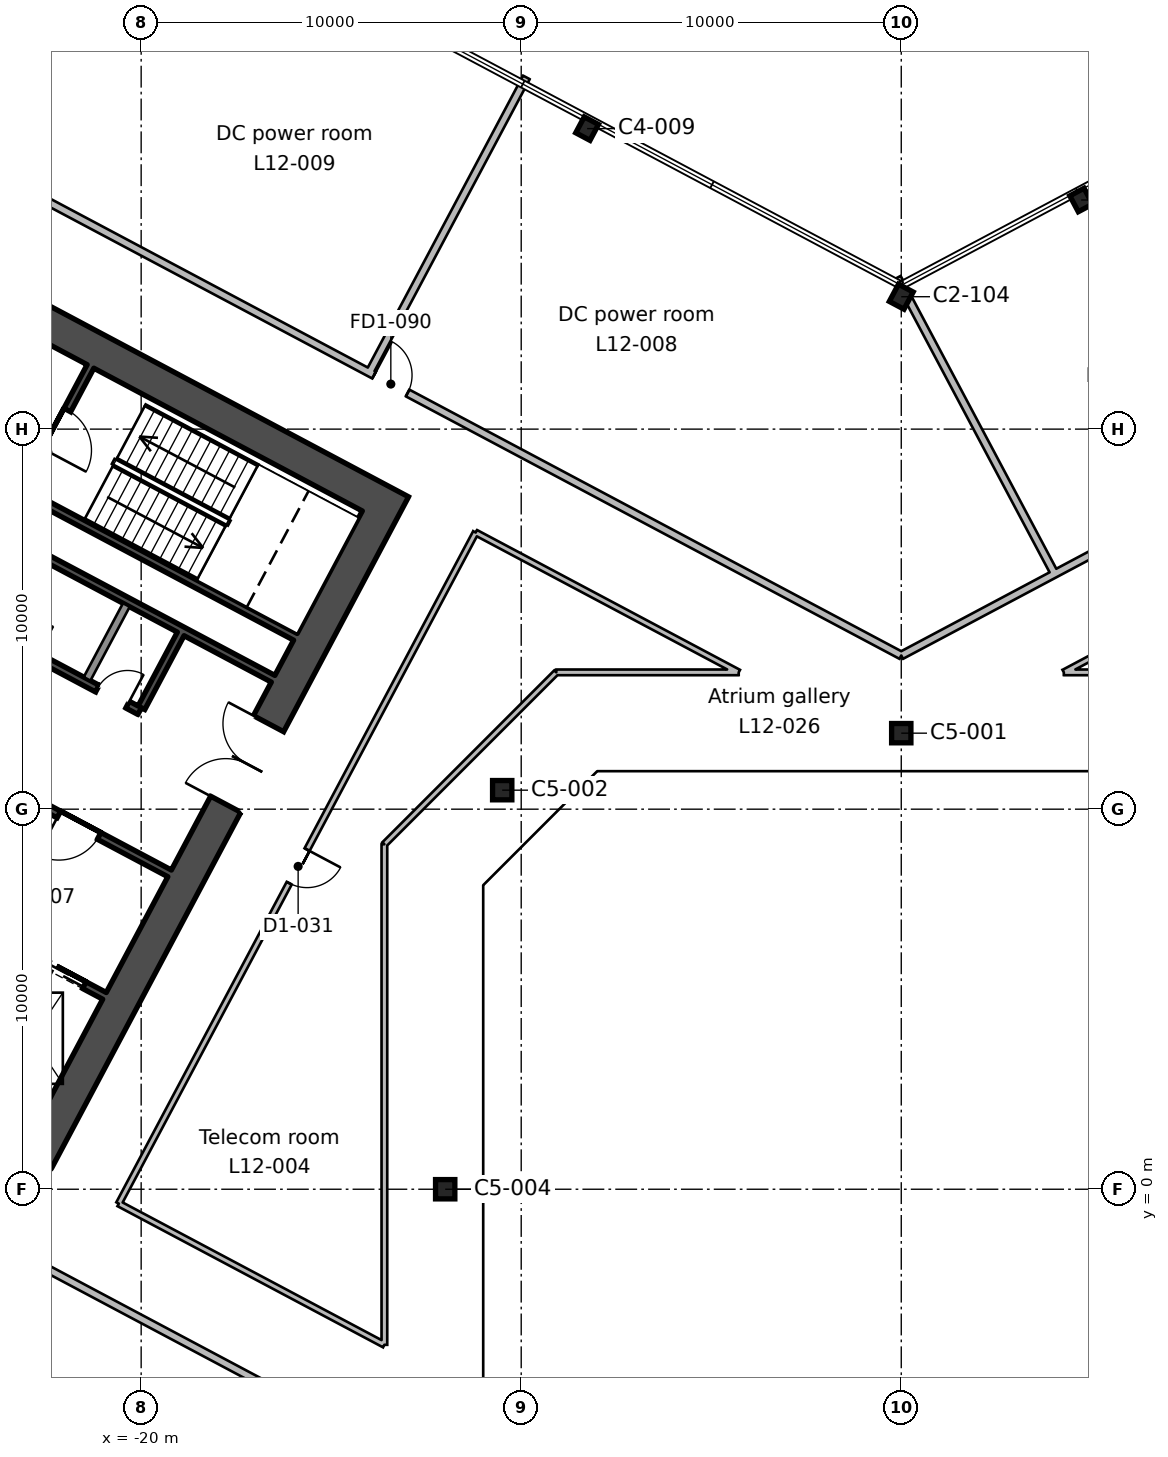
"""IFC4 building model, lengths in metres.
Left out: names, types, materials, properties, quantities, classifications, styles, units other than length and angle.
Written with IfcOpenShell. Run it as: python <this file> out.ifc"""

import sys

from ifc_helpers import new_model, si_unit, direction, frame, frame_2d, origin, origin_2d, place, context, subcontext, project, spatial, rectangle, hollow_rectangle, i_section, extrude, element, fill, save


model = new_model("IFC4")
c1 = context("Model", 3, precision=1e-05, world=origin(), true_north=direction((0.0, 1.0)))
c2 = subcontext(c1, "Body", "Model", "MODEL_VIEW")
j1 = project(units=[si_unit("LENGTHUNIT", "METRE"), si_unit("PLANEANGLEUNIT", "RADIAN")], contexts=[c1])
p1 = place(None, origin())
s1 = spatial("IfcSite", under=j1, at=p1, CompositionType="ELEMENT")
p2 = place(p1, origin())
s2 = spatial("IfcBuilding", under=s1, at=p2, CompositionType="ELEMENT")
p3 = place(p2, frame((0.0, 0.0, 66.2)))
s3 = spatial("IfcBuildingStorey", under=s2, at=p3, CompositionType="ELEMENT", Elevation=66.2)
for number, where, z_axis, x_axis in (
    (1, (-12.0, 0.0, 0.0), (0.0, 0.0, 1.0), (1.0, 0.0, 0.0)),
    (2, (-10.5, 10.5, 0.0), (0.0, 0.0, 1.0), (1.0, 0.0, 0.0)),
    (3, (0.0, 12.0, 0.0), (0.0, 0.0, 1.0), (1.0, 0.0, 0.0)),
):
    element("IfcColumn", number, at=place(p3, frame(where, z_axis=z_axis, x_axis=x_axis)), inside=s3, PredefinedType="COLUMN", context=c2, shape_type="SweptSolid", body=[
        extrude(hollow_rectangle(XDim=0.508, YDim=0.508, WallThickness=0.021, InnerFilletRadius=0.01, OuterFilletRadius=0.031, at=origin_2d()), origin(), (0.0, 0.0, 1.0), 4.6),
    ])
p4 = place(p3, frame((0.0, 23.484, 0.0), z_axis=(0.0, 0.0, 1.0), x_axis=(-0.882947592859, 0.469471562786, 0.0)))
e4 = element("IfcColumn", 4, at=p4, inside=s3, PredefinedType="COLUMN", context=c2, shape_type="SweptSolid", body=[
    extrude(i_section(OverallWidth=0.437, OverallDepth=0.513, WebThickness=0.061, FlangeThickness=0.097, FilletRadius=0.015, at=origin_2d()), origin(), (0.0, 0.0, 1.0), 4.6),
])
for number, where, z_axis, x_axis in (
    (5, (4.734, 26.029, 0.0), (0.0, 0.0, 1.0), (-0.883, -0.469, 0.0)),
    (6, (-8.266, 27.907, 0.0), (0.0, 0.0, 1.0), (-0.883, 0.469, 0.0)),
):
    element("IfcColumn", number, at=place(p3, frame(where, z_axis=z_axis, x_axis=x_axis)), inside=s3, PredefinedType="COLUMN", context=c2, shape_type="SweptSolid", body=[
        extrude(i_section(OverallWidth=0.424, OverallDepth=0.475, WebThickness=0.048, FlangeThickness=0.077, FilletRadius=0.015, at=origin_2d()), origin(), (0.0, 0.0, 1.0), 4.6),
    ])
p5 = place(p3, frame((-13.362, 18.43, 0.0), z_axis=(0.0, 0.0, 1.0), x_axis=(-0.46947084998, -0.882947971864, 0.0)))
e7 = element("IfcWall", 7, at=p5, inside=s3, PredefinedType="SHEAR", context=c2, shape_type="SweptSolid", body=[
    extrude(rectangle(XDim=20.0, YDim=0.9, at=frame_2d((10.0, 0.0))), origin(), (0.0, 0.0, 1.0), 4.6),
])
p6 = place(p5, frame((7.0, 0.0, 0.0)))
e8 = element("IfcOpeningElement", 8, at=p6, cuts=e7, PredefinedType="OPENING", context=c2, shape_type="SweptSolid", body=[
    extrude(rectangle(XDim=2.4, YDim=2.4, at=frame_2d((1.2, 1.2))), frame((0.0, 0.46, 0.0), z_axis=(0.0, -1.0, 0.0), x_axis=(1.0, 0.0, 0.0)), (0.0, 0.0, 1.0), 0.92),
])
p7 = place(p3, frame((-13.97, 18.244, 0.0), z_axis=(0.0, 0.0, 1.0), x_axis=(-0.88294509198, 0.469476266226, 0.0)))
e9 = element("IfcWall", 9, at=p7, inside=s3, PredefinedType="SHEAR", context=c2, shape_type="SweptSolid", body=[
    extrude(rectangle(XDim=20.2, YDim=0.9, at=frame_2d((10.1, 0.0))), origin(), (0.0, 0.0, 1.0), 4.6),
])
p8 = place(p3, frame((-18.96, 14.611, 0.0), z_axis=(0.0, 0.0, 1.0), x_axis=(-0.4694473164, -0.882960484464, 0.0)))
e10 = element("IfcWall", 10, at=p8, inside=s3, PredefinedType="SHEAR", context=c2, shape_type="SweptSolid", body=[
    extrude(rectangle(XDim=2.2, YDim=0.2, at=frame_2d((1.1, 0.0))), origin(), (0.0, 0.0, 1.0), 4.6),
])
p9 = place(p3, frame((-20.39, 15.372, 0.0), z_axis=(0.0, 0.0, 1.0), x_axis=(-0.4694473164, -0.882960484464, 0.0)))
e11 = element("IfcWall", 11, at=p9, inside=s3, PredefinedType="SOLIDWALL", context=c2, shape_type="SweptSolid", body=[
    extrude(rectangle(XDim=2.2, YDim=0.2, at=frame_2d((1.1, 0.0))), origin(), (0.0, 0.0, 1.0), 4.6),
])
p10 = place(p3, frame((-21.333, 21.649, 0.0), z_axis=(0.0, 0.0, 1.0), x_axis=(-0.469494272526, -0.882935517501, 0.0)))
e12 = element("IfcWall", 12, at=p10, inside=s3, PredefinedType="SHEAR", context=c2, shape_type="SweptSolid", body=[
    extrude(rectangle(XDim=7.3, YDim=0.2, at=frame_2d((3.65, 0.0))), origin(), (0.0, 0.0, 1.0), 4.6),
])
p11 = place(p10, frame((1.3, 0.0, 0.0)))
e13 = element("IfcOpeningElement", 13, at=p11, cuts=e12, PredefinedType="OPENING", context=c2, shape_type="SweptSolid", body=[
    extrude(rectangle(XDim=1.2, YDim=2.1, at=frame_2d((0.6, 1.05))), frame((0.0, 0.11, 0.0), z_axis=(0.0, -1.0, 0.0), x_axis=(1.0, 0.0, 0.0)), (0.0, 0.0, 1.0), 0.22),
])
p12 = place(p3, frame((-15.942, 14.536, 0.0), z_axis=(0.0, 0.0, 1.0), x_axis=(-0.882946947542, 0.469472776449, 0.0)))
e14 = element("IfcWall", 14, at=p12, inside=s3, PredefinedType="SHEAR", context=c2, shape_type="SweptSolid", body=[
    extrude(rectangle(XDim=8.0, YDim=0.2, at=frame_2d((4.0, 0.0))), origin(), (0.0, 0.0, 1.0), 4.6),
])
p13 = place(p3, frame((-16.529, 13.432, 0.0), z_axis=(0.0, 0.0, 1.0), x_axis=(-0.88295287151, 0.469461634952, 0.0)))
e15 = element("IfcWall", 15, at=p13, inside=s3, PredefinedType="SHEAR", context=c2, shape_type="SweptSolid", body=[
    extrude(rectangle(XDim=8.0, YDim=0.2, at=frame_2d((4.0, 0.0))), origin(), (0.0, 0.0, 1.0), 4.6),
])
p14 = place(p3, frame((-20.04, 12.581, 0.0), z_axis=(0.0, 0.0, 1.0), x_axis=(-0.882942972946, 0.469480251476, 0.0)))
e16 = element("IfcWall", 16, at=p14, inside=s3, PredefinedType="SHEAR", context=c2, shape_type="SweptSolid", body=[
    extrude(rectangle(XDim=5.4, YDim=0.2, at=frame_2d((2.7, 0.0))), origin(), (0.0, 0.0, 1.0), 4.6),
])
p15 = place(p14, frame((0.36, 0.0, 0.0)))
e17 = element("IfcOpeningElement", 17, at=p15, cuts=e16, PredefinedType="OPENING", context=c2, shape_type="SweptSolid", body=[
    extrude(rectangle(XDim=0.9, YDim=2.1, at=frame_2d((0.45, 1.05))), frame((0.0, 0.11, 0.0), z_axis=(0.0, -1.0, 0.0), x_axis=(1.0, 0.0, 0.0)), (0.0, 0.0, 1.0), 0.22),
])
p16 = place(p14, frame((3.06, 0.0, 0.0)))
e18 = element("IfcOpeningElement", 18, at=p16, cuts=e16, PredefinedType="OPENING", context=c2, shape_type="SweptSolid", body=[
    extrude(rectangle(XDim=0.9, YDim=2.1, at=frame_2d((0.45, 1.05))), frame((0.0, 0.11, 0.0), z_axis=(0.0, -1.0, 0.0), x_axis=(1.0, 0.0, 0.0)), (0.0, 0.0, 1.0), 0.22),
])
p17 = place(p3, frame((-19.252, 8.311, 0.0), z_axis=(0.0, 0.0, 1.0), x_axis=(-0.882955722218, 0.469456273365, 0.0)))
e19 = element("IfcWall", 19, at=p17, inside=s3, PredefinedType="SHEAR", context=c2, shape_type="SweptSolid", body=[
    extrude(rectangle(XDim=10.0, YDim=0.2, at=frame_2d((5.0, 0.0))), origin(), (0.0, 0.0, 1.0), 4.6),
])
p18 = place(p17, frame((2.1, 0.0, 0.0)))
e20 = element("IfcOpeningElement", 20, at=p18, cuts=e19, PredefinedType="OPENING", context=c2, shape_type="SweptSolid", body=[
    extrude(rectangle(XDim=1.2, YDim=2.1, at=frame_2d((0.6, 1.05))), frame((0.0, 0.11, 0.0), z_axis=(0.0, -1.0, 0.0), x_axis=(1.0, 0.0, 0.0)), (0.0, 0.0, 1.0), 0.22),
])
p19 = place(p3, frame((-20.965, 5.088, 0.0), z_axis=(0.0, 0.0, 1.0), x_axis=(-0.882925986334, 0.469512196493, 0.0)))
e21 = element("IfcWall", 21, at=p19, inside=s3, PredefinedType="SHEAR", context=c2, shape_type="SweptSolid", body=[
    extrude(rectangle(XDim=4.5, YDim=0.2, at=frame_2d((2.25, 0.0))), origin(), (0.0, 0.0, 1.0), 4.6),
])
p20 = place(p19, frame((0.6, 0.0, 0.0)))
e22 = element("IfcOpeningElement", 22, at=p20, cuts=e21, PredefinedType="OPENING", context=c2, shape_type="SweptSolid", body=[
    extrude(rectangle(XDim=1.1, YDim=2.1, at=frame_2d((0.55, 1.05))), frame((0.0, 0.11, 0.0), z_axis=(0.0, -1.0, 0.0), x_axis=(1.0, 0.0, 0.0)), (0.0, 0.0, 1.0), 0.22),
])
p21 = place(p3, frame((-48.541, 39.854, 0.0), z_axis=(0.0, 0.0, 1.0), x_axis=(0.882945008423, -0.469476423372, 0.0)))
e23 = element("IfcWall", 23, at=p21, inside=s3, PredefinedType="PARTITIONING", context=c2, shape_type="SweptSolid", body=[
    extrude(rectangle(XDim=54.976, YDim=0.2, at=frame_2d((27.488, 0.0))), origin(), (0.0, 0.0, 1.0), 4.2),
])
p22 = place(p21, frame((39.265, 0.0, 0.0)))
e24 = element("IfcOpeningElement", 24, at=p22, cuts=e23, PredefinedType="OPENING", context=c2, shape_type="SweptSolid", body=[
    extrude(rectangle(XDim=1.0, YDim=2.1, at=frame_2d((0.5, 1.05))), frame((0.0, 0.11, 0.0), z_axis=(0.0, -1.0, 0.0), x_axis=(1.0, 0.0, 0.0)), (0.0, 0.0, 1.0), 0.22),
])
p23 = place(p21, frame((27.265, 0.0, 0.0)))
e25 = element("IfcOpeningElement", 25, at=p23, cuts=e23, PredefinedType="OPENING", context=c2, shape_type="SweptSolid", body=[
    extrude(rectangle(XDim=1.0, YDim=2.1, at=frame_2d((0.5, 1.05))), frame((0.0, 0.11, 0.0), z_axis=(0.0, -1.0, 0.0), x_axis=(1.0, 0.0, 0.0)), (0.0, 0.0, 1.0), 0.22),
])
p24 = place(p21, frame((21.065, 0.0, 0.0)))
e26 = element("IfcOpeningElement", 26, at=p24, cuts=e23, PredefinedType="OPENING", context=c2, shape_type="SweptSolid", body=[
    extrude(rectangle(XDim=0.95, YDim=2.1, at=frame_2d((0.475, 1.05))), frame((0.0, 0.11, 0.0), z_axis=(0.0, -1.0, 0.0), x_axis=(1.0, 0.0, 0.0)), (0.0, 0.0, 1.0), 0.22),
])
p25 = place(p21, frame((15.365, 0.0, 0.0)))
e27 = element("IfcOpeningElement", 27, at=p25, cuts=e23, PredefinedType="OPENING", context=c2, shape_type="SweptSolid", body=[
    extrude(rectangle(XDim=1.0, YDim=2.1, at=frame_2d((0.5, 1.05))), frame((0.0, 0.11, 0.0), z_axis=(0.0, -1.0, 0.0), x_axis=(1.0, 0.0, 0.0)), (0.0, 0.0, 1.0), 0.22),
])
p26 = place(p3, frame((0.0, 14.044, 0.0), z_axis=(0.0, 0.0, 1.0), x_axis=(0.882943219941, 0.469479786955, 0.0)))
e28 = element("IfcWall", 28, at=p26, inside=s3, PredefinedType="PARTITIONING", context=c2, shape_type="SweptSolid", body=[
    extrude(rectangle(XDim=65.607, YDim=0.2, at=frame_2d((32.803, 0.0))), origin(), (0.0, 0.0, 1.0), 4.2),
])
p27 = place(p26, frame((35.55, 0.0, 0.0)))
e29 = element("IfcOpeningElement", 29, at=p27, cuts=e28, PredefinedType="OPENING", context=c2, shape_type="SweptSolid", body=[
    extrude(rectangle(XDim=1.0, YDim=2.1, at=frame_2d((0.5, 1.05))), frame((0.0, 0.11, 0.0), z_axis=(0.0, -1.0, 0.0), x_axis=(1.0, 0.0, 0.0)), (0.0, 0.0, 1.0), 0.22),
])
p28 = place(p26, frame((32.15, 0.0, 0.0)))
e30 = element("IfcOpeningElement", 30, at=p28, cuts=e28, PredefinedType="OPENING", context=c2, shape_type="SweptSolid", body=[
    extrude(rectangle(XDim=1.0, YDim=2.1, at=frame_2d((0.5, 1.05))), frame((0.0, 0.11, 0.0), z_axis=(0.0, -1.0, 0.0), x_axis=(1.0, 0.0, 0.0)), (0.0, 0.0, 1.0), 0.22),
])
p29 = place(p26, frame((13.95, 0.0, 0.0)))
e31 = element("IfcOpeningElement", 31, at=p29, cuts=e28, PredefinedType="OPENING", context=c2, shape_type="SweptSolid", body=[
    extrude(rectangle(XDim=1.0, YDim=2.1, at=frame_2d((0.5, 1.05))), frame((0.0, 0.11, 0.0), z_axis=(0.0, -1.0, 0.0), x_axis=(1.0, 0.0, 0.0)), (0.0, 0.0, 1.0), 0.22),
])
p30 = place(p3, frame((-13.6, -6.813, 0.0), z_axis=(0.0, 0.0, 1.0), x_axis=(-0.882934546757, 0.469496098113, 0.0)))
e32 = element("IfcWall", 32, at=p30, inside=s3, PredefinedType="PARTITIONING", context=c2, shape_type="SweptSolid", body=[
    extrude(rectangle(XDim=36.758, YDim=0.2, at=frame_2d((18.379, 0.0))), origin(), (0.0, 0.0, 1.0), 4.2),
])
p31 = place(p30, frame((20.35, 0.0, 0.0)))
e33 = element("IfcOpeningElement", 33, at=p31, cuts=e32, PredefinedType="OPENING", context=c2, shape_type="SweptSolid", body=[
    extrude(rectangle(XDim=1.0, YDim=2.1, at=frame_2d((0.5, 1.05))), frame((0.0, 0.11, 0.0), z_axis=(0.0, -1.0, 0.0), x_axis=(1.0, 0.0, 0.0)), (0.0, 0.0, 1.0), 0.22),
])
p32 = place(p30, frame((17.85, 0.0, 0.0)))
e34 = element("IfcOpeningElement", 34, at=p32, cuts=e32, PredefinedType="OPENING", context=c2, shape_type="SweptSolid", body=[
    extrude(rectangle(XDim=1.0, YDim=2.1, at=frame_2d((0.5, 1.05))), frame((0.0, 0.11, 0.0), z_axis=(0.0, -1.0, 0.0), x_axis=(1.0, 0.0, 0.0)), (0.0, 0.0, 1.0), 0.22),
])
p33 = place(p3, frame((-9.864, 29.255, 0.0), z_axis=(0.0, 0.0, 1.0), x_axis=(-0.469457446168, -0.882955098653, 0.0)))
e35 = element("IfcWall", 35, at=p33, inside=s3, PredefinedType="PARTITIONING", context=c2, shape_type="SweptSolid", body=[
    extrude(rectangle(XDim=8.8, YDim=0.2, at=frame_2d((4.4, 0.0))), origin(), (0.0, 0.0, 1.0), 4.2),
])
p34 = place(p3, frame((-0.105, 23.984, 0.0), z_axis=(0.0, 0.0, 1.0), x_axis=(0.469424872141, -0.882972417132, 0.0)))
e36 = element("IfcWall", 36, at=p34, inside=s3, PredefinedType="PARTITIONING", context=c2, shape_type="SweptSolid", body=[
    extrude(rectangle(XDim=8.826, YDim=0.2, at=frame_2d((4.413, 0.0))), origin(), (0.0, 0.0, 1.0), 4.2),
])
p35 = place(p3, frame((-20.588, -0.379, 0.0), z_axis=(0.0, 0.0, 1.0), x_axis=(0.469489882812, 0.882937851685, 0.0)))
e37 = element("IfcWall", 37, at=p35, inside=s3, PredefinedType="PARTITIONING", context=c2, shape_type="SweptSolid", body=[
    extrude(rectangle(XDim=20.0, YDim=0.15, at=frame_2d((10.0, 0.0))), origin(), (0.0, 0.0, 1.0), 4.2),
])
p36 = place(p35, frame((9.55, 0.0, 0.0)))
e38 = element("IfcOpeningElement", 38, at=p36, cuts=e37, PredefinedType="OPENING", context=c2, shape_type="SweptSolid", body=[
    extrude(rectangle(XDim=1.0, YDim=2.1, at=frame_2d((0.5, 1.05))), frame((0.0, 0.085, 0.0), z_axis=(0.0, -1.0, 0.0), x_axis=(1.0, 0.0, 0.0)), (0.0, 0.0, 1.0), 0.17),
])
p37 = place(p3, frame((-11.198, 17.28, 0.0), z_axis=(0.0, 0.0, 1.0), x_axis=(0.882946288452, -0.46947401601, 0.0)))
e39 = element("IfcWall", 39, at=p37, inside=s3, PredefinedType="PARTITIONING", context=c2, shape_type="SweptSolid", body=[
    extrude(rectangle(XDim=7.838, YDim=0.15, at=frame_2d((3.919, 0.0))), origin(), (0.0, 0.0, 1.0), 4.2),
])
p38 = place(p3, frame((-4.277, 13.6, 0.0), z_axis=(0.0, 0.0, 1.0), x_axis=(-1.0, 0.0, 0.0)))
e40 = element("IfcWall", 40, at=p38, inside=s3, PredefinedType="PARTITIONING", context=c2, shape_type="SweptSolid", body=[
    extrude(rectangle(XDim=4.8, YDim=0.15, at=frame_2d((2.4, 0.0))), origin(), (0.0, 0.0, 1.0), 4.2),
])
p39 = place(p3, frame((-9.077, 13.6, 0.0), z_axis=(0.0, 0.0, 1.0), x_axis=(-0.707106781187, -0.707106781187, 0.0)))
e41 = element("IfcWall", 41, at=p39, inside=s3, PredefinedType="PARTITIONING", context=c2, shape_type="SweptSolid", body=[
    extrude(rectangle(XDim=6.397, YDim=0.15, at=frame_2d((3.198, 0.0))), origin(), (0.0, 0.0, 1.0), 4.2),
])
p40 = place(p3, frame((-13.6, 9.077, 0.0), z_axis=(0.0, 0.0, 1.0), x_axis=(0.0, -1.0, 0.0)))
e42 = element("IfcWall", 42, at=p40, inside=s3, PredefinedType="PARTITIONING", context=c2, shape_type="SweptSolid", body=[
    extrude(rectangle(XDim=13.171, YDim=0.15, at=frame_2d((6.585, 0.0))), origin(), (0.0, 0.0, 1.0), 4.2),
])
p41 = place(p3, frame((-13.6, -4.094, 0.0), z_axis=(0.0, 0.0, 1.0), x_axis=(-0.882967890474, 0.469433386533, 0.0)))
e43 = element("IfcWall", 43, at=p41, inside=s3, PredefinedType="PARTITIONING", context=c2, shape_type="SweptSolid", body=[
    extrude(rectangle(XDim=7.914, YDim=0.15, at=frame_2d((3.957, 0.0))), origin(), (0.0, 0.0, 1.0), 4.2),
])
p42 = place(p3, frame((7.667, 15.402, 0.0), z_axis=(0.0, 0.0, 1.0), x_axis=(-0.882994654303, -0.469383042378, 0.0)))
e44 = element("IfcWall", 44, at=p42, inside=s3, PredefinedType="PARTITIONING", context=c2, shape_type="SweptSolid", body=[
    extrude(rectangle(XDim=3.839, YDim=0.15, at=frame_2d((1.919, 0.0))), origin(), (0.0, 0.0, 1.0), 4.2),
])
p43 = place(p3, frame((4.277, 13.6, 0.0), z_axis=(0.0, 0.0, 1.0), x_axis=(1.0, 0.0, 0.0)))
e45 = element("IfcWall", 45, at=p43, inside=s3, PredefinedType="PARTITIONING", context=c2, shape_type="SweptSolid", body=[
    extrude(rectangle(XDim=4.348, YDim=0.15, at=frame_2d((2.174, 0.0))), origin(), (0.0, 0.0, 1.0), 4.2),
])
p44 = place(p6, frame((2.4, 0.0, 0.0), z_axis=(0.0, 0.0, 1.0), x_axis=(-1.0, 0.0, 0.0)))
e46 = element("IfcDoor", 46, at=p44, inside=s3, OperationType="DOUBLE_DOOR_SINGLE_SWING", PredefinedType="DOOR", context=c2, shape_type="SweptSolid", body=[
    extrude(rectangle(XDim=2.4, YDim=2.4, at=frame_2d((1.2, 1.2))), frame((0.0, 0.025, 0.0), z_axis=(0.0, -1.0, 0.0), x_axis=(1.0, 0.0, 0.0)), (0.0, 0.0, 1.0), 0.05),
])
fill(e8, e46)
p45 = place(p18, origin())
e47 = element("IfcDoor", 47, at=p45, inside=s3, OperationType="SINGLE_SWING_RIGHT", PredefinedType="DOOR", context=c2, shape_type="SweptSolid", body=[
    extrude(rectangle(XDim=1.2, YDim=2.1, at=frame_2d((0.6, 1.05))), frame((0.0, 0.025, 0.0), z_axis=(0.0, -1.0, 0.0), x_axis=(1.0, 0.0, 0.0)), (0.0, 0.0, 1.0), 0.05),
])
fill(e20, e47)
p46 = place(p11, origin())
e48 = element("IfcDoor", 48, at=p46, inside=s3, OperationType="SINGLE_SWING_RIGHT", PredefinedType="DOOR", context=c2, shape_type="SweptSolid", body=[
    extrude(rectangle(XDim=1.2, YDim=2.1, at=frame_2d((0.6, 1.05))), frame((0.0, 0.025, 0.0), z_axis=(0.0, -1.0, 0.0), x_axis=(1.0, 0.0, 0.0)), (0.0, 0.0, 1.0), 0.05),
])
fill(e13, e48)
p47 = place(p15, frame((0.9, 0.0, 0.0), z_axis=(0.0, 0.0, 1.0), x_axis=(-1.0, 0.0, 0.0)))
e49 = element("IfcDoor", 49, at=p47, inside=s3, OperationType="SINGLE_SWING_RIGHT", PredefinedType="DOOR", context=c2, shape_type="SweptSolid", body=[
    extrude(rectangle(XDim=0.9, YDim=2.1, at=frame_2d((0.45, 1.05))), frame((0.0, 0.025, 0.0), z_axis=(0.0, -1.0, 0.0), x_axis=(1.0, 0.0, 0.0)), (0.0, 0.0, 1.0), 0.05),
])
fill(e17, e49)
p48 = place(p20, origin())
e50 = element("IfcDoor", 50, at=p48, inside=s3, OperationType="DOUBLE_DOOR_SLIDING", PredefinedType="DOOR", context=c2, shape_type="SweptSolid", body=[
    extrude(rectangle(XDim=1.1, YDim=2.1, at=frame_2d((0.55, 1.05))), frame((0.0, 0.025, 0.0), z_axis=(0.0, -1.0, 0.0), x_axis=(1.0, 0.0, 0.0)), (0.0, 0.0, 1.0), 0.05),
])
fill(e22, e50)
p49 = place(p36, frame((1.0, 0.0, 0.0), z_axis=(0.0, 0.0, 1.0), x_axis=(-1.0, 0.0, 0.0)))
e51 = element("IfcDoor", 51, at=p49, inside=s3, OperationType="SINGLE_SWING_LEFT", PredefinedType="DOOR", context=c2, shape_type="SweptSolid", body=[
    extrude(rectangle(XDim=1.0, YDim=2.1, at=frame_2d((0.5, 1.05))), frame((0.0, 0.025, 0.0), z_axis=(0.0, -1.0, 0.0), x_axis=(1.0, 0.0, 0.0)), (0.0, 0.0, 1.0), 0.05),
])
fill(e38, e51)
p50 = place(p22, origin())
e52 = element("IfcDoor", 52, at=p50, inside=s3, OperationType="SINGLE_SWING_LEFT", PredefinedType="DOOR", context=c2, shape_type="SweptSolid", body=[
    extrude(rectangle(XDim=1.0, YDim=2.1, at=frame_2d((0.5, 1.05))), frame((0.0, 0.025, 0.0), z_axis=(0.0, -1.0, 0.0), x_axis=(1.0, 0.0, 0.0)), (0.0, 0.0, 1.0), 0.05),
])
fill(e24, e52)
save(model, sys.argv[1])
